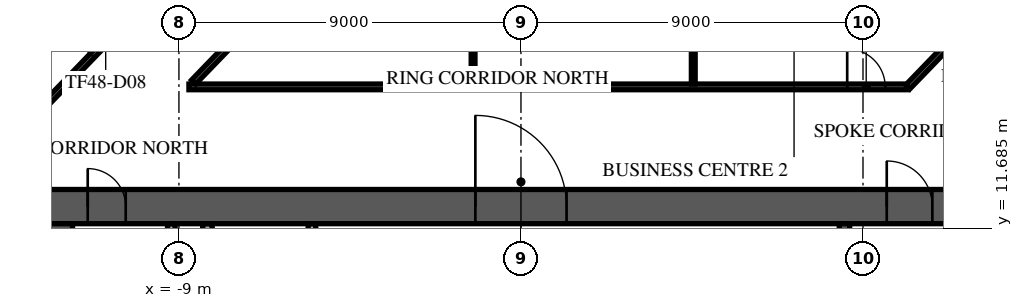
"""IFC4 building model, lengths in metres.
Left out: names, types, materials, properties, quantities, classifications, styles, units other than length and angle.
Written with IfcOpenShell. Run it as: python <this file> out.ifc"""

import sys

from ifc_helpers import new_model, si_unit, direction, frame, frame_2d, origin, place, context, subcontext, project, spatial, rectangle, extrude, element, fill, save


model = new_model("IFC4")
c1 = context("Model", 3, precision=1e-05, world=origin(), true_north=direction((0.0, 1.0)))
c2 = subcontext(c1, "Body", "Model", "MODEL_VIEW")
j1 = project(units=[si_unit("LENGTHUNIT", "METRE"), si_unit("PLANEANGLEUNIT", "RADIAN")], contexts=[c1])
p1 = place(None, origin())
s1 = spatial("IfcSite", under=j1, at=p1, CompositionType="ELEMENT")
p2 = place(p1, origin())
s2 = spatial("IfcBuilding", under=s1, at=p2, CompositionType="ELEMENT")
p3 = place(p2, frame((0.0, 0.0, 205.3)))
s3 = spatial("IfcBuildingStorey", under=s2, at=p3, CompositionType="ELEMENT", Elevation=205.3)
p4 = place(p3, frame((-12.7, 12.25, 0.0), z_axis=(0.0, 0.0, 1.0), x_axis=(1.0, 0.0, 0.0)))
e1 = element("IfcWall", 1, at=p4, inside=s3, PredefinedType="SHEAR", context=c2, shape_type="SweptSolid", body=[
    extrude(rectangle(XDim=25.4, YDim=0.9, at=frame_2d((12.7, 0.0))), origin(), (0.0, 0.0, 1.0), 3.62),
])
p5 = place(p4, frame((11.5, 0.0, 0.0)))
e2 = element("IfcOpeningElement", 2, at=p5, cuts=e1, PredefinedType="OPENING", context=c2, shape_type="SweptSolid", body=[
    extrude(rectangle(XDim=2.4, YDim=2.4, at=frame_2d((1.2, 1.2))), frame((0.0, 0.46, 0.0), z_axis=(0.0, -1.0, 0.0), x_axis=(1.0, 0.0, 0.0)), (0.0, 0.0, 1.0), 0.92),
])
p6 = place(p4, frame((22.325, 0.0, 0.0)))
e3 = element("IfcOpeningElement", 3, at=p6, cuts=e1, PredefinedType="OPENING", context=c2, shape_type="SweptSolid", body=[
    extrude(rectangle(XDim=1.2, YDim=2.1, at=frame_2d((0.6, 1.05))), frame((0.0, 0.46, 0.0), z_axis=(0.0, -1.0, 0.0), x_axis=(1.0, 0.0, 0.0)), (0.0, 0.0, 1.0), 0.92),
])
p7 = place(p4, frame((1.3, 0.0, 0.0)))
e4 = element("IfcOpeningElement", 4, at=p7, cuts=e1, PredefinedType="OPENING", context=c2, shape_type="SweptSolid", body=[
    extrude(rectangle(XDim=1.0, YDim=2.1, at=frame_2d((0.5, 1.05))), frame((0.0, 0.46, 0.0), z_axis=(0.0, -1.0, 0.0), x_axis=(1.0, 0.0, 0.0)), (0.0, 0.0, 1.0), 0.92),
])
p8 = place(p3, frame((-12.25, -11.8, 0.0), z_axis=(0.0, 0.0, 1.0), x_axis=(0.0, 1.0, 0.0)))
e5 = element("IfcWall", 5, at=p8, inside=s3, PredefinedType="SHEAR", context=c2, shape_type="SweptSolid", body=[
    extrude(rectangle(XDim=23.6, YDim=0.9, at=frame_2d((11.8, 0.0))), origin(), (0.0, 0.0, 1.0), 3.62),
])
p9 = place(p8, frame((10.6, 0.0, 0.0)))
e6 = element("IfcOpeningElement", 6, at=p9, cuts=e5, PredefinedType="OPENING", context=c2, shape_type="SweptSolid", body=[
    extrude(rectangle(XDim=2.4, YDim=2.4, at=frame_2d((1.2, 1.2))), frame((0.0, 0.46, 0.0), z_axis=(0.0, -1.0, 0.0), x_axis=(1.0, 0.0, 0.0)), (0.0, 0.0, 1.0), 0.92),
])
p10 = place(p3, frame((8.512, 4.55, 0.0), z_axis=(0.0, 0.0, 1.0), x_axis=(0.0, 1.0, 0.0)))
e7 = element("IfcWall", 7, at=p10, inside=s3, PredefinedType="SOLIDWALL", context=c2, shape_type="SweptSolid", body=[
    extrude(rectangle(XDim=7.25, YDim=0.275, at=frame_2d((3.625, 0.0))), origin(), (0.0, 0.0, 1.0), 3.62),
])
p11 = place(p10, frame((6.0, 0.0, 0.0)))
e8 = element("IfcOpeningElement", 8, at=p11, cuts=e7, PredefinedType="OPENING", context=c2, shape_type="SweptSolid", body=[
    extrude(rectangle(XDim=1.0, YDim=2.1, at=frame_2d((0.5, 1.05))), frame((0.0, 0.147, 0.0), z_axis=(0.0, -1.0, 0.0), x_axis=(1.0, 0.0, 0.0)), (0.0, 0.0, 1.0), 0.295),
])
p12 = place(p3, frame((-9.2, 4.78, 0.0), z_axis=(0.0, 0.0, 1.0), x_axis=(0.0, 1.0, 0.0)))
e9 = element("IfcWall", 9, at=p12, inside=s3, PredefinedType="PARTITIONING", context=c2, shape_type="SweptSolid", body=[
    extrude(rectangle(XDim=7.015, YDim=0.2, at=frame_2d((3.507, 0.0))), origin(), (0.0, 0.0, 1.0), 3.62),
])
p13 = place(p12, frame((2.92, 0.0, 0.0)))
e10 = element("IfcOpeningElement", 10, at=p13, cuts=e9, PredefinedType="OPENING", context=c2, shape_type="SweptSolid", body=[
    extrude(rectangle(XDim=1.0, YDim=2.1, at=frame_2d((0.5, 1.05))), frame((0.0, 0.11, 0.0), z_axis=(0.0, -1.0, 0.0), x_axis=(1.0, 0.0, 0.0)), (0.0, 0.0, 1.0), 0.22),
])
p14 = place(p3, frame((-8.25, 8.805, 0.0), z_axis=(0.0, 0.0, 1.0), x_axis=(0.0, 1.0, 0.0)))
e11 = element("IfcWall", 11, at=p14, inside=s3, PredefinedType="PARTITIONING", context=c2, shape_type="SweptSolid", body=[
    extrude(rectangle(XDim=2.99, YDim=0.25, at=frame_2d((1.495, 0.0))), origin(), (0.0, 0.0, 1.0), 3.62),
])
p15 = place(p14, frame((0.895, 0.0, 0.0)))
e12 = element("IfcOpeningElement", 12, at=p15, cuts=e11, PredefinedType="OPENING", context=c2, shape_type="SweptSolid", body=[
    extrude(rectangle(XDim=1.0, YDim=2.1, at=frame_2d((0.5, 1.05))), frame((0.0, 0.135, 0.0), z_axis=(0.0, -1.0, 0.0), x_axis=(1.0, 0.0, 0.0)), (0.0, 0.0, 1.0), 0.27),
])
p16 = place(p3, frame((-5.5, 8.805, 0.0), z_axis=(0.0, 0.0, 1.0), x_axis=(0.0, 1.0, 0.0)))
e13 = element("IfcWall", 13, at=p16, inside=s3, PredefinedType="PARTITIONING", context=c2, shape_type="SweptSolid", body=[
    extrude(rectangle(XDim=2.99, YDim=0.2, at=frame_2d((1.495, 0.0))), origin(), (0.0, 0.0, 1.0), 3.62),
])
p17 = place(p16, frame((0.532, 0.0, 0.0)))
e14 = element("IfcOpeningElement", 14, at=p17, cuts=e13, PredefinedType="OPENING", context=c2, shape_type="SweptSolid", body=[
    extrude(rectangle(XDim=1.8, YDim=2.1, at=frame_2d((0.9, 1.05))), frame((0.0, 0.11, 0.0), z_axis=(0.0, -1.0, 0.0), x_axis=(1.0, 0.0, 0.0)), (0.0, 0.0, 1.0), 0.22),
])
p18 = place(p3, frame((-0.749, 34.782, 0.0), z_axis=(0.0, 0.0, 1.0), x_axis=(-0.694657553534, -0.719340589233, 0.0)))
e15 = element("IfcWall", 15, at=p18, inside=s3, PredefinedType="STANDARD", context=c2, shape_type="SweptSolid", body=[
    extrude(rectangle(XDim=49.0, YDim=0.6, at=frame_2d((24.5, 0.0))), origin(), (0.0, 0.0, 1.0), 3.62),
])
p19 = place(p18, frame((1.227, 0.0, 0.9)))
e16 = element("IfcOpeningElement", 16, at=p19, cuts=e15, PredefinedType="OPENING", context=c2, shape_type="SweptSolid", body=[
    extrude(rectangle(XDim=2.0, YDim=2.1, at=frame_2d((1.0, 1.05))), frame((0.0, 0.31, 0.0), z_axis=(0.0, -1.0, 0.0), x_axis=(1.0, 0.0, 0.0)), (0.0, 0.0, 1.0), 0.62),
])
p20 = place(p18, frame((5.682, 0.0, 0.9)))
e17 = element("IfcOpeningElement", 17, at=p20, cuts=e15, PredefinedType="OPENING", context=c2, shape_type="SweptSolid", body=[
    extrude(rectangle(XDim=2.0, YDim=2.1, at=frame_2d((1.0, 1.05))), frame((0.0, 0.31, 0.0), z_axis=(0.0, -1.0, 0.0), x_axis=(1.0, 0.0, 0.0)), (0.0, 0.0, 1.0), 0.62),
])
p21 = place(p18, frame((10.136, 0.0, 0.9)))
e18 = element("IfcOpeningElement", 18, at=p21, cuts=e15, PredefinedType="OPENING", context=c2, shape_type="SweptSolid", body=[
    extrude(rectangle(XDim=2.0, YDim=2.1, at=frame_2d((1.0, 1.05))), frame((0.0, 0.31, 0.0), z_axis=(0.0, -1.0, 0.0), x_axis=(1.0, 0.0, 0.0)), (0.0, 0.0, 1.0), 0.62),
])
p22 = place(p18, frame((14.591, 0.0, 0.9)))
e19 = element("IfcOpeningElement", 19, at=p22, cuts=e15, PredefinedType="OPENING", context=c2, shape_type="SweptSolid", body=[
    extrude(rectangle(XDim=2.0, YDim=2.1, at=frame_2d((1.0, 1.05))), frame((0.0, 0.31, 0.0), z_axis=(0.0, -1.0, 0.0), x_axis=(1.0, 0.0, 0.0)), (0.0, 0.0, 1.0), 0.62),
])
p23 = place(p18, frame((19.045, 0.0, 0.9)))
e20 = element("IfcOpeningElement", 20, at=p23, cuts=e15, PredefinedType="OPENING", context=c2, shape_type="SweptSolid", body=[
    extrude(rectangle(XDim=2.0, YDim=2.1, at=frame_2d((1.0, 1.05))), frame((0.0, 0.31, 0.0), z_axis=(0.0, -1.0, 0.0), x_axis=(1.0, 0.0, 0.0)), (0.0, 0.0, 1.0), 0.62),
])
p24 = place(p18, frame((23.5, 0.0, 0.9)))
e21 = element("IfcOpeningElement", 21, at=p24, cuts=e15, PredefinedType="OPENING", context=c2, shape_type="SweptSolid", body=[
    extrude(rectangle(XDim=2.0, YDim=2.1, at=frame_2d((1.0, 1.05))), frame((0.0, 0.31, 0.0), z_axis=(0.0, -1.0, 0.0), x_axis=(1.0, 0.0, 0.0)), (0.0, 0.0, 1.0), 0.62),
])
p25 = place(p18, frame((27.955, 0.0, 0.9)))
e22 = element("IfcOpeningElement", 22, at=p25, cuts=e15, PredefinedType="OPENING", context=c2, shape_type="SweptSolid", body=[
    extrude(rectangle(XDim=2.0, YDim=2.1, at=frame_2d((1.0, 1.05))), frame((0.0, 0.31, 0.0), z_axis=(0.0, -1.0, 0.0), x_axis=(1.0, 0.0, 0.0)), (0.0, 0.0, 1.0), 0.62),
])
p26 = place(p18, frame((32.409, 0.0, 0.9)))
e23 = element("IfcOpeningElement", 23, at=p26, cuts=e15, PredefinedType="OPENING", context=c2, shape_type="SweptSolid", body=[
    extrude(rectangle(XDim=2.0, YDim=2.1, at=frame_2d((1.0, 1.05))), frame((0.0, 0.31, 0.0), z_axis=(0.0, -1.0, 0.0), x_axis=(1.0, 0.0, 0.0)), (0.0, 0.0, 1.0), 0.62),
])
p27 = place(p18, frame((36.864, 0.0, 0.9)))
e24 = element("IfcOpeningElement", 24, at=p27, cuts=e15, PredefinedType="OPENING", context=c2, shape_type="SweptSolid", body=[
    extrude(rectangle(XDim=2.0, YDim=2.1, at=frame_2d((1.0, 1.05))), frame((0.0, 0.31, 0.0), z_axis=(0.0, -1.0, 0.0), x_axis=(1.0, 0.0, 0.0)), (0.0, 0.0, 1.0), 0.62),
])
p28 = place(p18, frame((41.318, 0.0, 0.9)))
e25 = element("IfcOpeningElement", 25, at=p28, cuts=e15, PredefinedType="OPENING", context=c2, shape_type="SweptSolid", body=[
    extrude(rectangle(XDim=2.0, YDim=2.1, at=frame_2d((1.0, 1.05))), frame((0.0, 0.31, 0.0), z_axis=(0.0, -1.0, 0.0), x_axis=(1.0, 0.0, 0.0)), (0.0, 0.0, 1.0), 0.62),
])
p29 = place(p18, frame((45.773, 0.0, 0.9)))
e26 = element("IfcOpeningElement", 26, at=p29, cuts=e15, PredefinedType="OPENING", context=c2, shape_type="SweptSolid", body=[
    extrude(rectangle(XDim=2.0, YDim=2.1, at=frame_2d((1.0, 1.05))), frame((0.0, 0.31, 0.0), z_axis=(0.0, -1.0, 0.0), x_axis=(1.0, 0.0, 0.0)), (0.0, 0.0, 1.0), 0.62),
])
p30 = place(p3, frame((34.658, 7.819, 0.0), z_axis=(0.0, 0.0, 1.0), x_axis=(-0.719340729741, 0.694657408034, 0.0)))
e27 = element("IfcWall", 27, at=p30, inside=s3, PredefinedType="STANDARD", context=c2, shape_type="SweptSolid", body=[
    extrude(rectangle(XDim=39.0, YDim=0.6, at=frame_2d((19.5, 0.0))), origin(), (0.0, 0.0, 1.0), 3.62),
])
p31 = place(p30, frame((1.217, 0.0, 0.9)))
e28 = element("IfcOpeningElement", 28, at=p31, cuts=e27, PredefinedType="OPENING", context=c2, shape_type="SweptSolid", body=[
    extrude(rectangle(XDim=1.9, YDim=2.1, at=frame_2d((0.95, 1.05))), frame((0.0, 0.31, 0.0), z_axis=(0.0, -1.0, 0.0), x_axis=(1.0, 0.0, 0.0)), (0.0, 0.0, 1.0), 0.62),
])
p32 = place(p30, frame((5.55, 0.0, 0.9)))
e29 = element("IfcOpeningElement", 29, at=p32, cuts=e27, PredefinedType="OPENING", context=c2, shape_type="SweptSolid", body=[
    extrude(rectangle(XDim=1.9, YDim=2.1, at=frame_2d((0.95, 1.05))), frame((0.0, 0.31, 0.0), z_axis=(0.0, -1.0, 0.0), x_axis=(1.0, 0.0, 0.0)), (0.0, 0.0, 1.0), 0.62),
])
p33 = place(p30, frame((9.883, 0.0, 0.9)))
e30 = element("IfcOpeningElement", 30, at=p33, cuts=e27, PredefinedType="OPENING", context=c2, shape_type="SweptSolid", body=[
    extrude(rectangle(XDim=1.9, YDim=2.1, at=frame_2d((0.95, 1.05))), frame((0.0, 0.31, 0.0), z_axis=(0.0, -1.0, 0.0), x_axis=(1.0, 0.0, 0.0)), (0.0, 0.0, 1.0), 0.62),
])
p34 = place(p30, frame((14.217, 0.0, 0.9)))
e31 = element("IfcOpeningElement", 31, at=p34, cuts=e27, PredefinedType="OPENING", context=c2, shape_type="SweptSolid", body=[
    extrude(rectangle(XDim=1.9, YDim=2.1, at=frame_2d((0.95, 1.05))), frame((0.0, 0.31, 0.0), z_axis=(0.0, -1.0, 0.0), x_axis=(1.0, 0.0, 0.0)), (0.0, 0.0, 1.0), 0.62),
])
p35 = place(p30, frame((18.55, 0.0, 0.9)))
e32 = element("IfcOpeningElement", 32, at=p35, cuts=e27, PredefinedType="OPENING", context=c2, shape_type="SweptSolid", body=[
    extrude(rectangle(XDim=1.9, YDim=2.1, at=frame_2d((0.95, 1.05))), frame((0.0, 0.31, 0.0), z_axis=(0.0, -1.0, 0.0), x_axis=(1.0, 0.0, 0.0)), (0.0, 0.0, 1.0), 0.62),
])
p36 = place(p30, frame((22.883, 0.0, 0.9)))
e33 = element("IfcOpeningElement", 33, at=p36, cuts=e27, PredefinedType="OPENING", context=c2, shape_type="SweptSolid", body=[
    extrude(rectangle(XDim=1.9, YDim=2.1, at=frame_2d((0.95, 1.05))), frame((0.0, 0.31, 0.0), z_axis=(0.0, -1.0, 0.0), x_axis=(1.0, 0.0, 0.0)), (0.0, 0.0, 1.0), 0.62),
])
p37 = place(p30, frame((27.217, 0.0, 0.9)))
e34 = element("IfcOpeningElement", 34, at=p37, cuts=e27, PredefinedType="OPENING", context=c2, shape_type="SweptSolid", body=[
    extrude(rectangle(XDim=1.9, YDim=2.1, at=frame_2d((0.95, 1.05))), frame((0.0, 0.31, 0.0), z_axis=(0.0, -1.0, 0.0), x_axis=(1.0, 0.0, 0.0)), (0.0, 0.0, 1.0), 0.62),
])
p38 = place(p30, frame((31.55, 0.0, 0.9)))
e35 = element("IfcOpeningElement", 35, at=p38, cuts=e27, PredefinedType="OPENING", context=c2, shape_type="SweptSolid", body=[
    extrude(rectangle(XDim=1.9, YDim=2.1, at=frame_2d((0.95, 1.05))), frame((0.0, 0.31, 0.0), z_axis=(0.0, -1.0, 0.0), x_axis=(1.0, 0.0, 0.0)), (0.0, 0.0, 1.0), 0.62),
])
p39 = place(p30, frame((35.883, 0.0, 0.9)))
e36 = element("IfcOpeningElement", 36, at=p39, cuts=e27, PredefinedType="OPENING", context=c2, shape_type="SweptSolid", body=[
    extrude(rectangle(XDim=1.9, YDim=2.1, at=frame_2d((0.95, 1.05))), frame((0.0, 0.31, 0.0), z_axis=(0.0, -1.0, 0.0), x_axis=(1.0, 0.0, 0.0)), (0.0, 0.0, 1.0), 0.62),
])
p40 = place(p3, frame((-26.96, -0.016, 0.0), z_axis=(0.0, 0.0, 1.0), x_axis=(0.694654845656, 0.719343204184, 0.0)))
e37 = element("IfcWall", 37, at=p40, inside=s3, PredefinedType="PARTITIONING", context=c2, shape_type="SweptSolid", body=[
    extrude(rectangle(XDim=37.479, YDim=0.15, at=frame_2d((18.74, 0.0))), origin(), (0.0, 0.0, 1.0), 2.97),
])
p41 = place(p40, frame((4.3, 0.0, 0.0)))
e38 = element("IfcOpeningElement", 38, at=p41, cuts=e37, PredefinedType="OPENING", context=c2, shape_type="SweptSolid", body=[
    extrude(rectangle(XDim=1.8, YDim=2.1, at=frame_2d((0.9, 1.05))), frame((0.0, 0.085, 0.0), z_axis=(0.0, -1.0, 0.0), x_axis=(1.0, 0.0, 0.0)), (0.0, 0.0, 1.0), 0.17),
])
p42 = place(p40, frame((15.547, 0.0, 0.0)))
e39 = element("IfcOpeningElement", 39, at=p42, cuts=e37, PredefinedType="OPENING", context=c2, shape_type="SweptSolid", body=[
    extrude(rectangle(XDim=1.0, YDim=2.1, at=frame_2d((0.5, 1.05))), frame((0.0, 0.085, 0.0), z_axis=(0.0, -1.0, 0.0), x_axis=(1.0, 0.0, 0.0)), (0.0, 0.0, 1.0), 0.17),
])
p43 = place(p40, frame((22.58, 0.0, 0.0)))
e40 = element("IfcOpeningElement", 40, at=p43, cuts=e37, PredefinedType="OPENING", context=c2, shape_type="SweptSolid", body=[
    extrude(rectangle(XDim=1.0, YDim=2.1, at=frame_2d((0.5, 1.05))), frame((0.0, 0.085, 0.0), z_axis=(0.0, -1.0, 0.0), x_axis=(1.0, 0.0, 0.0)), (0.0, 0.0, 1.0), 0.17),
])
p44 = place(p40, frame((35.508, 0.0, 0.0)))
e41 = element("IfcOpeningElement", 41, at=p44, cuts=e37, PredefinedType="OPENING", context=c2, shape_type="SweptSolid", body=[
    extrude(rectangle(XDim=1.0, YDim=2.1, at=frame_2d((0.5, 1.05))), frame((0.0, 0.085, 0.0), z_axis=(0.0, -1.0, 0.0), x_axis=(1.0, 0.0, 0.0)), (0.0, 0.0, 1.0), 0.17),
])
p45 = place(p3, frame((-8.737, 15.4, 0.0), z_axis=(0.0, 0.0, 1.0), x_axis=(1.0, 0.0, 0.0)))
e42 = element("IfcWall", 42, at=p45, inside=s3, PredefinedType="PARTITIONING", context=c2, shape_type="SweptSolid", body=[
    extrude(rectangle(XDim=18.916, YDim=0.15, at=frame_2d((9.458, 0.0))), origin(), (0.0, 0.0, 1.0), 3.17),
])
p46 = place(p45, frame((17.321, 0.0, 0.0)))
e43 = element("IfcOpeningElement", 43, at=p46, cuts=e42, PredefinedType="OPENING", context=c2, shape_type="SweptSolid", body=[
    extrude(rectangle(XDim=1.0, YDim=2.1, at=frame_2d((0.5, 1.05))), frame((0.0, 0.085, 0.0), z_axis=(0.0, -1.0, 0.0), x_axis=(1.0, 0.0, 0.0)), (0.0, 0.0, 1.0), 0.17),
])
p47 = place(p3, frame((-8.614, 15.527, 0.0), z_axis=(0.0, 0.0, 1.0), x_axis=(0.694688688922, 0.719310520905, 0.0)))
e44 = element("IfcWall", 44, at=p47, inside=s3, PredefinedType="PARTITIONING", context=c2, shape_type="SweptSolid", body=[
    extrude(rectangle(XDim=13.555, YDim=0.15, at=frame_2d((6.777, 0.0))), origin(), (0.0, 0.0, 1.0), 3.17),
])
p48 = place(p47, frame((6.3, 0.0, 0.0)))
e45 = element("IfcOpeningElement", 45, at=p48, cuts=e44, PredefinedType="OPENING", context=c2, shape_type="SweptSolid", body=[
    extrude(rectangle(XDim=1.0, YDim=2.1, at=frame_2d((0.5, 1.05))), frame((0.0, 0.085, 0.0), z_axis=(0.0, -1.0, 0.0), x_axis=(1.0, 0.0, 0.0)), (0.0, 0.0, 1.0), 0.17),
])
p49 = place(p3, frame((5.597, 25.362, 0.0), z_axis=(0.0, 0.0, 1.0), x_axis=(0.719350067003, -0.69464773886, 0.0)))
e46 = element("IfcWall", 46, at=p49, inside=s3, PredefinedType="PARTITIONING", context=c2, shape_type="SweptSolid", body=[
    extrude(rectangle(XDim=27.258, YDim=0.15, at=frame_2d((13.629, 0.0))), origin(), (0.0, 0.0, 1.0), 3.17),
])
p50 = place(p49, frame((11.017, 0.0, 0.0)))
e47 = element("IfcOpeningElement", 47, at=p50, cuts=e46, PredefinedType="OPENING", context=c2, shape_type="SweptSolid", body=[
    extrude(rectangle(XDim=1.0, YDim=2.1, at=frame_2d((0.5, 1.05))), frame((0.0, 0.085, 0.0), z_axis=(0.0, -1.0, 0.0), x_axis=(1.0, 0.0, 0.0)), (0.0, 0.0, 1.0), 0.17),
])
p51 = place(p49, frame((16.287, 0.0, 0.0)))
e48 = element("IfcOpeningElement", 48, at=p51, cuts=e46, PredefinedType="OPENING", context=c2, shape_type="SweptSolid", body=[
    extrude(rectangle(XDim=1.0, YDim=2.1, at=frame_2d((0.5, 1.05))), frame((0.0, 0.085, 0.0), z_axis=(0.0, -1.0, 0.0), x_axis=(1.0, 0.0, 0.0)), (0.0, 0.0, 1.0), 0.17),
])
p52 = place(p49, frame((24.435, 0.0, 0.0)))
e49 = element("IfcOpeningElement", 49, at=p52, cuts=e46, PredefinedType="OPENING", context=c2, shape_type="SweptSolid", body=[
    extrude(rectangle(XDim=1.8, YDim=2.1, at=frame_2d((0.9, 1.05))), frame((0.0, 0.085, 0.0), z_axis=(0.0, -1.0, 0.0), x_axis=(1.0, 0.0, 0.0)), (0.0, 0.0, 1.0), 0.17),
])
p53 = place(p3, frame((10.18, 15.4, 0.0), z_axis=(0.0, 0.0, 1.0), x_axis=(0.694282379976, 0.719702700325, 0.0)))
e50 = element("IfcWall", 50, at=p53, inside=s3, PredefinedType="PARTITIONING", context=c2, shape_type="SweptSolid", body=[
    extrude(rectangle(XDim=1.508, YDim=0.15, at=frame_2d((0.754, 0.0))), origin(), (0.0, 0.0, 1.0), 3.17),
])
p54 = place(p3, frame((-1.26, 15.475, 0.0), z_axis=(0.0, 0.0, 1.0), x_axis=(0.0, 1.0, 0.0)))
e51 = element("IfcWall", 51, at=p54, inside=s3, PredefinedType="PARTITIONING", context=c2, shape_type="SweptSolid", body=[
    extrude(rectangle(XDim=7.507, YDim=0.1, at=frame_2d((3.754, 0.0))), origin(), (0.0, 0.0, 1.0), 3.62),
])
p55 = place(p3, frame((4.534, 15.475, 0.0), z_axis=(0.0, 0.0, 1.0), x_axis=(0.0, 1.0, 0.0)))
e52 = element("IfcWall", 52, at=p55, inside=s3, PredefinedType="PARTITIONING", context=c2, shape_type="SweptSolid", body=[
    extrude(rectangle(XDim=4.257, YDim=0.1, at=frame_2d((2.128, 0.0))), origin(), (0.0, 0.0, 1.0), 3.62),
])
p56 = place(p5, origin())
e53 = element("IfcDoor", 53, at=p56, inside=s3, OperationType="SINGLE_SWING_LEFT", PredefinedType="DOOR", context=c2, shape_type="SweptSolid", body=[
    extrude(rectangle(XDim=2.4, YDim=2.4, at=frame_2d((1.2, 1.2))), frame((0.0, 0.025, 0.0), z_axis=(0.0, -1.0, 0.0), x_axis=(1.0, 0.0, 0.0)), (0.0, 0.0, 1.0), 0.05),
])
fill(e2, e53)
p57 = place(p6, origin())
e54 = element("IfcDoor", 54, at=p57, inside=s3, OperationType="SINGLE_SWING_LEFT", PredefinedType="DOOR", context=c2, shape_type="SweptSolid", body=[
    extrude(rectangle(XDim=1.2, YDim=2.1, at=frame_2d((0.6, 1.05))), frame((0.0, 0.025, 0.0), z_axis=(0.0, -1.0, 0.0), x_axis=(1.0, 0.0, 0.0)), (0.0, 0.0, 1.0), 0.05),
])
fill(e3, e54)
p58 = place(p7, origin())
e55 = element("IfcDoor", 55, at=p58, inside=s3, OperationType="SINGLE_SWING_LEFT", PredefinedType="DOOR", context=c2, shape_type="SweptSolid", body=[
    extrude(rectangle(XDim=1.0, YDim=2.1, at=frame_2d((0.5, 1.05))), frame((0.0, 0.025, 0.0), z_axis=(0.0, -1.0, 0.0), x_axis=(1.0, 0.0, 0.0)), (0.0, 0.0, 1.0), 0.05),
])
fill(e4, e55)
p59 = place(p43, origin())
e56 = element("IfcDoor", 56, at=p59, inside=s3, OperationType="SINGLE_SWING_RIGHT", PredefinedType="DOOR", context=c2, shape_type="SweptSolid", body=[
    extrude(rectangle(XDim=1.0, YDim=2.1, at=frame_2d((0.5, 1.05))), frame((0.0, 0.025, 0.0), z_axis=(0.0, -1.0, 0.0), x_axis=(1.0, 0.0, 0.0)), (0.0, 0.0, 1.0), 0.05),
])
fill(e40, e56)
p60 = place(p46, origin())
e57 = element("IfcDoor", 57, at=p60, inside=s3, OperationType="SINGLE_SWING_LEFT", PredefinedType="DOOR", context=c2, shape_type="SweptSolid", body=[
    extrude(rectangle(XDim=1.0, YDim=2.1, at=frame_2d((0.5, 1.05))), frame((0.0, 0.025, 0.0), z_axis=(0.0, -1.0, 0.0), x_axis=(1.0, 0.0, 0.0)), (0.0, 0.0, 1.0), 0.05),
])
fill(e43, e57)
save(model, sys.argv[1])
